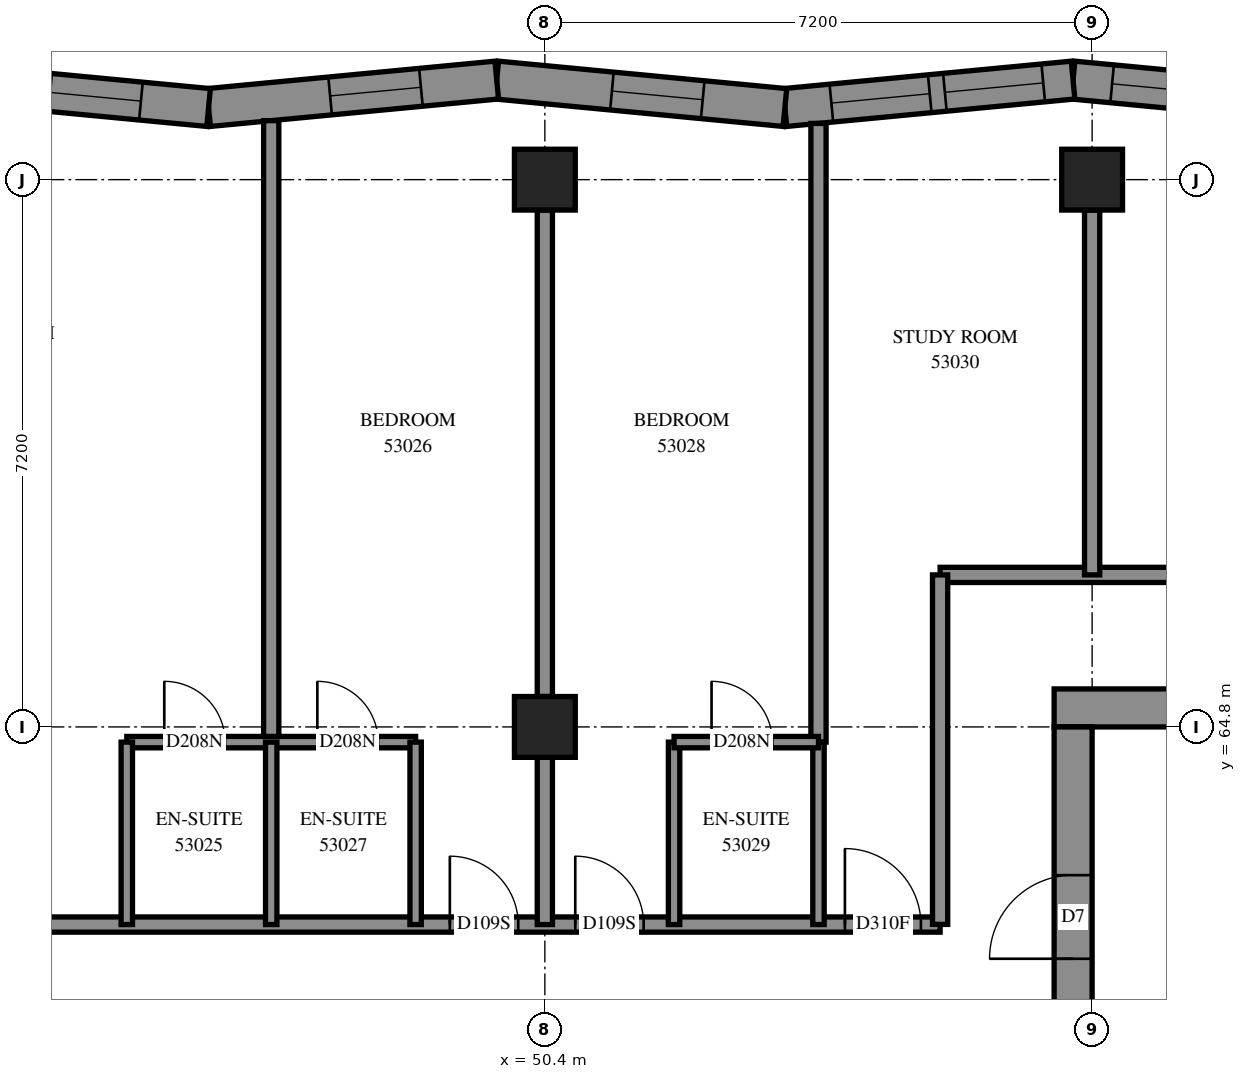
"""IFC4 building model, lengths in metres.
Left out: names, types, materials, properties, quantities, classifications, styles, units other than length and angle.
Written with IfcOpenShell. Run it as: python <this file> out.ifc"""

import sys

from ifc_helpers import new_model, si_unit, direction, frame, frame_2d, origin, origin_2d, place, context, subcontext, project, spatial, polyline, rectangle, outline, extrude, element, fill, save


model = new_model("IFC4")
c1 = context("Model", 3, precision=1e-05, world=origin(), true_north=direction((0.0, 1.0)))
c2 = subcontext(c1, "Body", "Model", "MODEL_VIEW")
j1 = project(units=[si_unit("LENGTHUNIT", "METRE"), si_unit("PLANEANGLEUNIT", "RADIAN")], contexts=[c1])
p1 = place(None, origin())
s1 = spatial("IfcSite", under=j1, at=p1, CompositionType="ELEMENT")
p2 = place(p1, origin())
s2 = spatial("IfcBuilding", under=s1, at=p2, CompositionType="ELEMENT")
p3 = place(p2, frame((0.0, 0.0, 196.4)))
s3 = spatial("IfcBuildingStorey", under=s2, at=p3, CompositionType="ELEMENT", Elevation=196.4)
for number, where, z_axis, x_axis in (
    (1, (50.4, 64.8, 0.0), (0.0, 0.0, 1.0), (1.0, 0.0, 0.0)),
    (2, (50.4, 72.0, 0.0), (0.0, 0.0, 1.0), (1.0, 0.0, 0.0)),
    (3, (57.6, 72.0, 0.0), (0.0, 0.0, 1.0), (1.0, 0.0, 0.0)),
):
    element("IfcColumn", number, at=place(p3, frame(where, z_axis=z_axis, x_axis=x_axis)), inside=s3, PredefinedType="COLUMN", context=c2, shape_type="SweptSolid", body=[
        extrude(rectangle(XDim=0.8, YDim=0.8, at=origin_2d()), origin(), (0.0, 0.0, 1.0), 3.1),
    ])
p4 = place(p3, frame((57.1, 65.05, -0.3), z_axis=(0.0, 0.0, 1.0), x_axis=(1.0, 0.0, 0.0)))
e4 = element("IfcWall", 4, at=p4, inside=s3, PredefinedType="SHEAR", context=c2, shape_type="SweptSolid", body=[
    extrude(rectangle(XDim=15.4, YDim=0.5, at=frame_2d((7.7, 0.0))), origin(), (0.0, 0.0, 1.0), 2.7),
])
p5 = place(p4, frame((10.5, 0.0, 0.3)))
e5 = element("IfcOpeningElement", 5, at=p5, cuts=e4, PredefinedType="OPENING", context=c2, shape_type="SweptSolid", body=[
    extrude(rectangle(XDim=0.8, YDim=2.1, at=frame_2d((0.4, 1.05))), frame((0.0, 0.26, 0.0), z_axis=(0.0, -1.0, 0.0), x_axis=(1.0, 0.0, 0.0)), (0.0, 0.0, 1.0), 0.52),
])
p6 = place(p3, frame((57.35, 50.4, -0.3), z_axis=(0.0, 0.0, 1.0), x_axis=(0.0, 1.0, 0.0)))
e6 = element("IfcWall", 6, at=p6, inside=s3, PredefinedType="SHEAR", context=c2, shape_type="SweptSolid", body=[
    extrude(rectangle(XDim=14.4, YDim=0.5, at=frame_2d((7.2, 0.0))), origin(), (0.0, 0.0, 1.0), 2.7),
])
p7 = place(p6, frame((4.55, 0.0, 0.3)))
e7 = element("IfcOpeningElement", 7, at=p7, cuts=e6, PredefinedType="OPENING", context=c2, shape_type="SweptSolid", body=[
    extrude(rectangle(XDim=1.1, YDim=2.1, at=frame_2d((0.55, 1.05))), frame((0.0, 0.26, 0.0), z_axis=(0.0, -1.0, 0.0), x_axis=(1.0, 0.0, 0.0)), (0.0, 0.0, 1.0), 0.52),
])
p8 = place(p6, frame((11.35, 0.0, 0.3)))
e8 = element("IfcOpeningElement", 8, at=p8, cuts=e6, PredefinedType="OPENING", context=c2, shape_type="SweptSolid", body=[
    extrude(rectangle(XDim=1.1, YDim=2.1, at=frame_2d((0.55, 1.05))), frame((0.0, 0.26, 0.0), z_axis=(0.0, -1.0, 0.0), x_axis=(1.0, 0.0, 0.0)), (0.0, 0.0, 1.0), 0.52),
])
p9 = place(p3, frame((61.14, 72.949, 0.0), z_axis=(0.0, 0.0, 1.0), x_axis=(-0.9954966527, 0.0947967005, 0.0)))
e9 = element("IfcWall", 9, at=p9, inside=s3, PredefinedType="SOLIDWALL", context=c2, shape_type="SweptSolid", body=[
    extrude(outline(polyline([(0.024, -0.25), (3.832, -0.25), (3.784, 0.25), (-0.024, 0.25), (0.024, -0.25)])), origin(), (0.0, 0.0, 1.0), 3.1),
])
p10 = place(p9, frame((0.492, 0.0, 0.45)))
e10 = element("IfcOpeningElement", 10, at=p10, cuts=e9, PredefinedType="OPENING", context=c2, shape_type="SweptSolid", body=[
    extrude(rectangle(XDim=1.3, YDim=2.5, at=frame_2d((0.65, 1.25))), frame((0.0, 0.26, 0.0), z_axis=(0.0, -1.0, 0.0), x_axis=(1.0, 0.0, 0.0)), (0.0, 0.0, 1.0), 0.52),
])
p11 = place(p9, frame((1.992, 0.0, 0.45)))
e11 = element("IfcOpeningElement", 11, at=p11, cuts=e9, PredefinedType="OPENING", context=c2, shape_type="SweptSolid", body=[
    extrude(rectangle(XDim=1.3, YDim=2.5, at=frame_2d((0.65, 1.25))), frame((0.0, 0.26, 0.0), z_axis=(0.0, -1.0, 0.0), x_axis=(1.0, 0.0, 0.0)), (0.0, 0.0, 1.0), 0.52),
])
p12 = place(p3, frame((57.349, 73.31, 0.0), z_axis=(0.0, 0.0, 1.0), x_axis=(-0.9954966527, -0.0947967005, 0.0)))
e12 = element("IfcWall", 12, at=p12, inside=s3, PredefinedType="SOLIDWALL", context=c2, shape_type="SweptSolid", body=[
    extrude(outline(polyline([(-0.024, -0.25), (3.784, -0.25), (3.832, 0.25), (0.024, 0.25), (-0.024, -0.25)])), origin(), (0.0, 0.0, 1.0), 3.1),
])
p13 = place(p12, frame((0.394, 0.0, 0.45)))
e13 = element("IfcOpeningElement", 13, at=p13, cuts=e12, PredefinedType="OPENING", context=c2, shape_type="SweptSolid", body=[
    extrude(rectangle(XDim=1.3, YDim=2.5, at=frame_2d((0.65, 1.25))), frame((0.0, 0.26, 0.0), z_axis=(0.0, -1.0, 0.0), x_axis=(1.0, 0.0, 0.0)), (0.0, 0.0, 1.0), 0.52),
])
p14 = place(p12, frame((1.894, 0.0, 0.45)))
e14 = element("IfcOpeningElement", 14, at=p14, cuts=e12, PredefinedType="OPENING", context=c2, shape_type="SweptSolid", body=[
    extrude(rectangle(XDim=1.3, YDim=2.5, at=frame_2d((0.65, 1.25))), frame((0.0, 0.26, 0.0), z_axis=(0.0, -1.0, 0.0), x_axis=(1.0, 0.0, 0.0)), (0.0, 0.0, 1.0), 0.52),
])
p15 = place(p3, frame((53.558, 72.949, 0.0), z_axis=(0.0, 0.0, 1.0), x_axis=(-0.9954966527, 0.0947967005, 0.0)))
e15 = element("IfcWall", 15, at=p15, inside=s3, PredefinedType="SOLIDWALL", context=c2, shape_type="SweptSolid", body=[
    extrude(outline(polyline([(0.024, -0.25), (3.832, -0.25), (3.784, 0.25), (-0.024, 0.25), (0.024, -0.25)])), origin(), (0.0, 0.0, 1.0), 3.1),
])
p16 = place(p15, frame((1.086, 0.0, 0.45)))
e16 = element("IfcOpeningElement", 16, at=p16, cuts=e15, PredefinedType="OPENING", context=c2, shape_type="SweptSolid", body=[
    extrude(rectangle(XDim=1.2, YDim=2.5, at=frame_2d((0.6, 1.25))), frame((0.0, 0.26, 0.0), z_axis=(0.0, -1.0, 0.0), x_axis=(1.0, 0.0, 0.0)), (0.0, 0.0, 1.0), 0.52),
])
p17 = place(p3, frame((49.767, 73.31, 0.0), z_axis=(0.0, 0.0, 1.0), x_axis=(-0.9954966527, -0.0947967005, 0.0)))
e17 = element("IfcWall", 17, at=p17, inside=s3, PredefinedType="SOLIDWALL", context=c2, shape_type="SweptSolid", body=[
    extrude(outline(polyline([(-0.024, -0.25), (3.784, -0.25), (3.832, 0.25), (0.024, 0.25), (-0.024, -0.25)])), origin(), (0.0, 0.0, 1.0), 3.1),
])
p18 = place(p17, frame((1.002, 0.0, 0.45)))
e18 = element("IfcOpeningElement", 18, at=p18, cuts=e17, PredefinedType="OPENING", context=c2, shape_type="SweptSolid", body=[
    extrude(rectangle(XDim=1.2, YDim=2.5, at=frame_2d((0.6, 1.25))), frame((0.0, 0.26, 0.0), z_axis=(0.0, -1.0, 0.0), x_axis=(1.0, 0.0, 0.0)), (0.0, 0.0, 1.0), 0.52),
])
p19 = place(p3, frame((45.976, 72.949, 0.0), z_axis=(0.0, 0.0, 1.0), x_axis=(-0.9954966527, 0.0947967005, 0.0)))
e19 = element("IfcWall", 19, at=p19, inside=s3, PredefinedType="SOLIDWALL", context=c2, shape_type="SweptSolid", body=[
    extrude(outline(polyline([(0.024, -0.25), (3.832, -0.25), (3.784, 0.25), (-0.024, 0.25), (0.024, -0.25)])), origin(), (0.0, 0.0, 1.0), 3.1),
])
p20 = place(p19, frame((0.894, 0.0, 0.45)))
e20 = element("IfcOpeningElement", 20, at=p20, cuts=e19, PredefinedType="OPENING", context=c2, shape_type="SweptSolid", body=[
    extrude(rectangle(XDim=1.2, YDim=2.5, at=frame_2d((0.6, 1.25))), frame((0.0, 0.26, 0.0), z_axis=(0.0, -1.0, 0.0), x_axis=(1.0, 0.0, 0.0)), (0.0, 0.0, 1.0), 0.52),
])
p21 = place(p3, frame((55.6, 66.8, 0.0), z_axis=(0.0, 0.0, 1.0), x_axis=(1.0, 0.0, 0.0)))
e21 = element("IfcWall", 21, at=p21, inside=s3, PredefinedType="PARTITIONING", context=c2, shape_type="SweptSolid", body=[
    extrude(rectangle(XDim=18.4, YDim=0.2, at=frame_2d((9.2, 0.0))), origin(), (0.0, 0.0, 1.0), 3.1),
])
p22 = place(p21, frame((5.886, 0.0, 0.0)))
e22 = element("IfcOpeningElement", 22, at=p22, cuts=e21, PredefinedType="OPENING", context=c2, shape_type="SweptSolid", body=[
    extrude(rectangle(XDim=1.0, YDim=2.1, at=frame_2d((0.5, 1.05))), frame((0.0, 0.11, 0.0), z_axis=(0.0, -1.0, 0.0), x_axis=(1.0, 0.0, 0.0)), (0.0, 0.0, 1.0), 0.22),
])
p23 = place(p21, frame((13.389, 0.0, 0.0)))
e23 = element("IfcOpeningElement", 23, at=p23, cuts=e21, PredefinedType="OPENING", context=c2, shape_type="SweptSolid", body=[
    extrude(rectangle(XDim=1.0, YDim=2.1, at=frame_2d((0.5, 1.05))), frame((0.0, 0.11, 0.0), z_axis=(0.0, -1.0, 0.0), x_axis=(1.0, 0.0, 0.0)), (0.0, 0.0, 1.0), 0.22),
])
p24 = place(p3, frame((40.602, 62.2, 0.0), z_axis=(0.0, 0.0, 1.0), x_axis=(1.0, 0.0, 0.0)))
e24 = element("IfcWall", 24, at=p24, inside=s3, PredefinedType="PARTITIONING", context=c2, shape_type="SweptSolid", body=[
    extrude(rectangle(XDim=14.998, YDim=0.2, at=frame_2d((7.499, 0.0))), origin(), (0.0, 0.0, 1.0), 3.1),
])
p25 = place(p24, frame((1.306, 0.0, 0.0)))
e25 = element("IfcOpeningElement", 25, at=p25, cuts=e24, PredefinedType="OPENING", context=c2, shape_type="SweptSolid", body=[
    extrude(rectangle(XDim=0.9, YDim=2.1, at=frame_2d((0.45, 1.05))), frame((0.0, 0.11, 0.0), z_axis=(0.0, -1.0, 0.0), x_axis=(1.0, 0.0, 0.0)), (0.0, 0.0, 1.0), 0.22),
])
p26 = place(p24, frame((8.548, 0.0, 0.0)))
e26 = element("IfcOpeningElement", 26, at=p26, cuts=e24, PredefinedType="OPENING", context=c2, shape_type="SweptSolid", body=[
    extrude(rectangle(XDim=0.9, YDim=2.1, at=frame_2d((0.45, 1.05))), frame((0.0, 0.11, 0.0), z_axis=(0.0, -1.0, 0.0), x_axis=(1.0, 0.0, 0.0)), (0.0, 0.0, 1.0), 0.22),
])
p27 = place(p24, frame((10.198, 0.0, 0.0)))
e27 = element("IfcOpeningElement", 27, at=p27, cuts=e24, PredefinedType="OPENING", context=c2, shape_type="SweptSolid", body=[
    extrude(rectangle(XDim=0.9, YDim=2.1, at=frame_2d((0.45, 1.05))), frame((0.0, 0.11, 0.0), z_axis=(0.0, -1.0, 0.0), x_axis=(1.0, 0.0, 0.0)), (0.0, 0.0, 1.0), 0.22),
])
p28 = place(p24, frame((13.746, 0.0, 0.0)))
e28 = element("IfcOpeningElement", 28, at=p28, cuts=e24, PredefinedType="OPENING", context=c2, shape_type="SweptSolid", body=[
    extrude(rectangle(XDim=1.0, YDim=2.1, at=frame_2d((0.5, 1.05))), frame((0.0, 0.11, 0.0), z_axis=(0.0, -1.0, 0.0), x_axis=(1.0, 0.0, 0.0)), (0.0, 0.0, 1.0), 0.22),
])
p29 = place(p3, frame((46.8, 64.6, 0.0), z_axis=(0.0, 0.0, 1.0), x_axis=(0.0, 1.0, 0.0)))
e29 = element("IfcWall", 29, at=p29, inside=s3, PredefinedType="PARTITIONING", context=c2, shape_type="SweptSolid", body=[
    extrude(rectangle(XDim=8.176, YDim=0.2, at=frame_2d((4.088, 0.0))), origin(), (0.0, 0.0, 1.0), 3.1),
])
p30 = place(p3, frame((54.0, 64.6, 0.0), z_axis=(0.0, 0.0, 1.0), x_axis=(0.0, 1.0, 0.0)))
e30 = element("IfcWall", 30, at=p30, inside=s3, PredefinedType="PARTITIONING", context=c2, shape_type="SweptSolid", body=[
    extrude(rectangle(XDim=8.14, YDim=0.2, at=frame_2d((4.07, 0.0))), origin(), (0.0, 0.0, 1.0), 3.1),
])
p31 = place(p3, frame((50.4, 65.2, 0.0), z_axis=(0.0, 0.0, 1.0), x_axis=(0.0, 1.0, 0.0)))
e31 = element("IfcWall", 31, at=p31, inside=s3, PredefinedType="PARTITIONING", context=c2, shape_type="SweptSolid", body=[
    extrude(rectangle(XDim=6.4, YDim=0.2, at=frame_2d((3.2, 0.0))), origin(), (0.0, 0.0, 1.0), 3.1),
])
p32 = place(p3, frame((57.6, 66.8, 0.0), z_axis=(0.0, 0.0, 1.0), x_axis=(0.0, 1.0, 0.0)))
e32 = element("IfcWall", 32, at=p32, inside=s3, PredefinedType="PARTITIONING", context=c2, shape_type="SweptSolid", body=[
    extrude(rectangle(XDim=4.8, YDim=0.2, at=frame_2d((2.4, 0.0))), origin(), (0.0, 0.0, 1.0), 3.1),
])
p33 = place(p3, frame((55.6, 62.202, 0.0), z_axis=(0.0, 0.0, 1.0), x_axis=(0.0, 1.0, 0.0)))
e33 = element("IfcWall", 33, at=p33, inside=s3, PredefinedType="PARTITIONING", context=c2, shape_type="SweptSolid", body=[
    extrude(rectangle(XDim=4.598, YDim=0.2, at=frame_2d((2.299, 0.0))), origin(), (0.0, 0.0, 1.0), 3.1),
])
p34 = place(p3, frame((44.9, 64.6, 0.0), z_axis=(0.0, 0.0, 1.0), x_axis=(1.0, 0.0, 0.0)))
e34 = element("IfcWall", 34, at=p34, inside=s3, PredefinedType="PARTITIONING", context=c2, shape_type="SweptSolid", body=[
    extrude(rectangle(XDim=3.8, YDim=0.15, at=frame_2d((1.9, 0.0))), origin(), (0.0, 0.0, 1.0), 3.1),
])
p35 = place(p34, frame((0.493, 0.0, 0.0)))
e35 = element("IfcOpeningElement", 35, at=p35, cuts=e34, PredefinedType="OPENING", context=c2, shape_type="SweptSolid", body=[
    extrude(rectangle(XDim=0.8, YDim=2.1, at=frame_2d((0.4, 1.05))), frame((0.0, 0.085, 0.0), z_axis=(0.0, -1.0, 0.0), x_axis=(1.0, 0.0, 0.0)), (0.0, 0.0, 1.0), 0.17),
])
p36 = place(p34, frame((2.507, 0.0, 0.0)))
e36 = element("IfcOpeningElement", 36, at=p36, cuts=e34, PredefinedType="OPENING", context=c2, shape_type="SweptSolid", body=[
    extrude(rectangle(XDim=0.8, YDim=2.1, at=frame_2d((0.4, 1.05))), frame((0.0, 0.085, 0.0), z_axis=(0.0, -1.0, 0.0), x_axis=(1.0, 0.0, 0.0)), (0.0, 0.0, 1.0), 0.17),
])
for number, where, z_axis, x_axis in (
    (37, (44.9, 62.2, 0.0), (0.0, 0.0, 1.0), (0.0, 1.0, 0.0)),
    (38, (46.8, 62.2, 0.0), (0.0, 0.0, 1.0), (0.0, 1.0, 0.0)),
    (39, (48.7, 62.2, 0.0), (0.0, 0.0, 1.0), (0.0, 1.0, 0.0)),
    (40, (52.1, 62.2, 0.0), (0.0, 0.0, 1.0), (0.0, 1.0, 0.0)),
    (41, (54.0, 62.2, 0.0), (0.0, 0.0, 1.0), (0.0, 1.0, 0.0)),
):
    element("IfcWall", number, at=place(p3, frame(where, z_axis=z_axis, x_axis=x_axis)), inside=s3, PredefinedType="PARTITIONING", context=c2, shape_type="SweptSolid", body=[
        extrude(rectangle(XDim=2.4, YDim=0.15, at=frame_2d((1.2, 0.0))), origin(), (0.0, 0.0, 1.0), 3.1),
    ])
p37 = place(p3, frame((50.4, 62.2, 0.0), z_axis=(0.0, 0.0, 1.0), x_axis=(0.0, 1.0, 0.0)))
e42 = element("IfcWall", 42, at=p37, inside=s3, PredefinedType="PARTITIONING", context=c2, shape_type="SweptSolid", body=[
    extrude(rectangle(XDim=2.2, YDim=0.2, at=frame_2d((1.1, 0.0))), origin(), (0.0, 0.0, 1.0), 3.1),
])
p38 = place(p3, frame((52.1, 64.6, 0.0), z_axis=(0.0, 0.0, 1.0), x_axis=(1.0, 0.0, 0.0)))
e43 = element("IfcWall", 43, at=p38, inside=s3, PredefinedType="PARTITIONING", context=c2, shape_type="SweptSolid", body=[
    extrude(rectangle(XDim=1.9, YDim=0.15, at=frame_2d((0.95, 0.0))), origin(), (0.0, 0.0, 1.0), 3.1),
])
p39 = place(p38, frame((0.493, 0.0, 0.0)))
e44 = element("IfcOpeningElement", 44, at=p39, cuts=e43, PredefinedType="OPENING", context=c2, shape_type="SweptSolid", body=[
    extrude(rectangle(XDim=0.8, YDim=2.1, at=frame_2d((0.4, 1.05))), frame((0.0, 0.085, 0.0), z_axis=(0.0, -1.0, 0.0), x_axis=(1.0, 0.0, 0.0)), (0.0, 0.0, 1.0), 0.17),
])
p40 = place(p11, origin())
e45 = element("IfcWindow", 45, at=p40, inside=s3, PartitioningType="SINGLE_PANEL", PredefinedType="WINDOW", context=c2, shape_type="SweptSolid", body=[
    extrude(rectangle(XDim=1.3, YDim=2.5, at=frame_2d((0.65, 1.25))), frame((0.0, 0.18, 0.0), z_axis=(0.0, -1.0, 0.0), x_axis=(1.0, 0.0, 0.0)), (0.0, 0.0, 1.0), 0.06),
])
fill(e11, e45)
p41 = place(p13, origin())
e46 = element("IfcWindow", 46, at=p41, inside=s3, PartitioningType="SINGLE_PANEL", PredefinedType="WINDOW", context=c2, shape_type="SweptSolid", body=[
    extrude(rectangle(XDim=1.3, YDim=2.5, at=frame_2d((0.65, 1.25))), frame((0.0, 0.18, 0.0), z_axis=(0.0, -1.0, 0.0), x_axis=(1.0, 0.0, 0.0)), (0.0, 0.0, 1.0), 0.06),
])
fill(e13, e46)
p42 = place(p14, origin())
e47 = element("IfcWindow", 47, at=p42, inside=s3, PartitioningType="SINGLE_PANEL", PredefinedType="WINDOW", context=c2, shape_type="SweptSolid", body=[
    extrude(rectangle(XDim=1.3, YDim=2.5, at=frame_2d((0.65, 1.25))), frame((0.0, 0.18, 0.0), z_axis=(0.0, -1.0, 0.0), x_axis=(1.0, 0.0, 0.0)), (0.0, 0.0, 1.0), 0.06),
])
fill(e14, e47)
p43 = place(p16, origin())
e48 = element("IfcWindow", 48, at=p43, inside=s3, PartitioningType="SINGLE_PANEL", PredefinedType="WINDOW", context=c2, shape_type="SweptSolid", body=[
    extrude(rectangle(XDim=1.2, YDim=2.5, at=frame_2d((0.6, 1.25))), frame((0.0, 0.18, 0.0), z_axis=(0.0, -1.0, 0.0), x_axis=(1.0, 0.0, 0.0)), (0.0, 0.0, 1.0), 0.06),
])
fill(e16, e48)
p44 = place(p18, origin())
e49 = element("IfcWindow", 49, at=p44, inside=s3, PartitioningType="SINGLE_PANEL", PredefinedType="WINDOW", context=c2, shape_type="SweptSolid", body=[
    extrude(rectangle(XDim=1.2, YDim=2.5, at=frame_2d((0.6, 1.25))), frame((0.0, 0.18, 0.0), z_axis=(0.0, -1.0, 0.0), x_axis=(1.0, 0.0, 0.0)), (0.0, 0.0, 1.0), 0.06),
])
fill(e18, e49)
p45 = place(p20, origin())
e50 = element("IfcWindow", 50, at=p45, inside=s3, PartitioningType="SINGLE_PANEL", PredefinedType="WINDOW", context=c2, shape_type="SweptSolid", body=[
    extrude(rectangle(XDim=1.2, YDim=2.5, at=frame_2d((0.6, 1.25))), frame((0.0, 0.18, 0.0), z_axis=(0.0, -1.0, 0.0), x_axis=(1.0, 0.0, 0.0)), (0.0, 0.0, 1.0), 0.06),
])
fill(e20, e50)
p46 = place(p8, origin())
e51 = element("IfcDoor", 51, at=p46, inside=s3, OperationType="SINGLE_SWING_LEFT", PredefinedType="DOOR", context=c2, shape_type="SweptSolid", body=[
    extrude(rectangle(XDim=1.1, YDim=2.1, at=frame_2d((0.55, 1.05))), frame((0.0, 0.025, 0.0), z_axis=(0.0, -1.0, 0.0), x_axis=(1.0, 0.0, 0.0)), (0.0, 0.0, 1.0), 0.05),
])
fill(e8, e51)
p47 = place(p35, origin())
e52 = element("IfcDoor", 52, at=p47, inside=s3, OperationType="SINGLE_SWING_RIGHT", PredefinedType="DOOR", context=c2, shape_type="SweptSolid", body=[
    extrude(rectangle(XDim=0.8, YDim=2.1, at=frame_2d((0.4, 1.05))), frame((0.0, 0.025, 0.0), z_axis=(0.0, -1.0, 0.0), x_axis=(1.0, 0.0, 0.0)), (0.0, 0.0, 1.0), 0.05),
])
fill(e35, e52)
p48 = place(p26, origin())
e53 = element("IfcDoor", 53, at=p48, inside=s3, OperationType="SINGLE_SWING_LEFT", PredefinedType="DOOR", context=c2, shape_type="SweptSolid", body=[
    extrude(rectangle(XDim=0.9, YDim=2.1, at=frame_2d((0.45, 1.05))), frame((0.0, 0.025, 0.0), z_axis=(0.0, -1.0, 0.0), x_axis=(1.0, 0.0, 0.0)), (0.0, 0.0, 1.0), 0.05),
])
fill(e26, e53)
p49 = place(p36, origin())
e54 = element("IfcDoor", 54, at=p49, inside=s3, OperationType="SINGLE_SWING_RIGHT", PredefinedType="DOOR", context=c2, shape_type="SweptSolid", body=[
    extrude(rectangle(XDim=0.8, YDim=2.1, at=frame_2d((0.4, 1.05))), frame((0.0, 0.025, 0.0), z_axis=(0.0, -1.0, 0.0), x_axis=(1.0, 0.0, 0.0)), (0.0, 0.0, 1.0), 0.05),
])
fill(e36, e54)
p50 = place(p27, origin())
e55 = element("IfcDoor", 55, at=p50, inside=s3, OperationType="SINGLE_SWING_RIGHT", PredefinedType="DOOR", context=c2, shape_type="SweptSolid", body=[
    extrude(rectangle(XDim=0.9, YDim=2.1, at=frame_2d((0.45, 1.05))), frame((0.0, 0.025, 0.0), z_axis=(0.0, -1.0, 0.0), x_axis=(1.0, 0.0, 0.0)), (0.0, 0.0, 1.0), 0.05),
])
fill(e27, e55)
p51 = place(p39, origin())
e56 = element("IfcDoor", 56, at=p51, inside=s3, OperationType="SINGLE_SWING_RIGHT", PredefinedType="DOOR", context=c2, shape_type="SweptSolid", body=[
    extrude(rectangle(XDim=0.8, YDim=2.1, at=frame_2d((0.4, 1.05))), frame((0.0, 0.025, 0.0), z_axis=(0.0, -1.0, 0.0), x_axis=(1.0, 0.0, 0.0)), (0.0, 0.0, 1.0), 0.05),
])
fill(e44, e56)
p52 = place(p28, origin())
e57 = element("IfcDoor", 57, at=p52, inside=s3, OperationType="SINGLE_SWING_LEFT", PredefinedType="DOOR", context=c2, shape_type="SweptSolid", body=[
    extrude(rectangle(XDim=1.0, YDim=2.1, at=frame_2d((0.5, 1.05))), frame((0.0, 0.025, 0.0), z_axis=(0.0, -1.0, 0.0), x_axis=(1.0, 0.0, 0.0)), (0.0, 0.0, 1.0), 0.05),
])
fill(e28, e57)
save(model, sys.argv[1])
